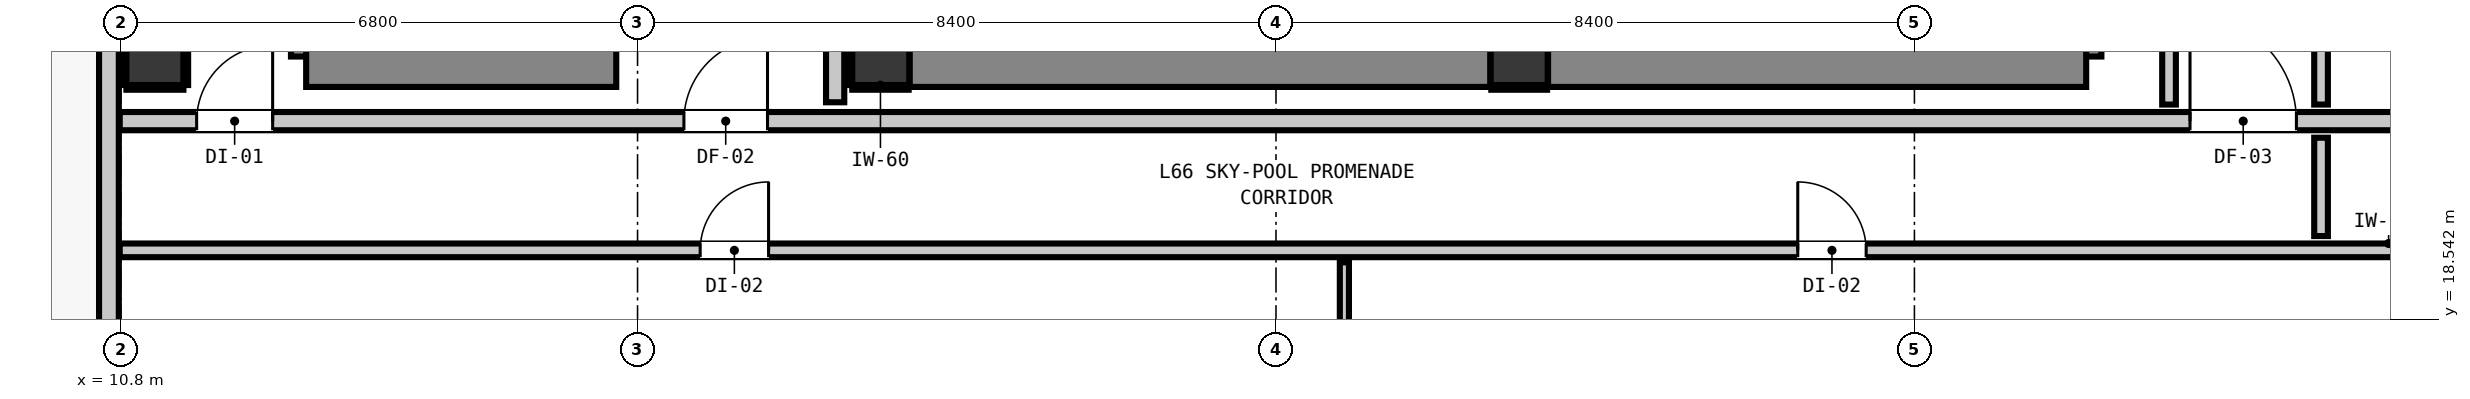
"""IFC4 building model, lengths in metres.
Left out: names, types, materials, properties, quantities, classifications, styles, units other than length and angle.
Written with IfcOpenShell. Run it as: python <this file> out.ifc"""

import sys

from ifc_helpers import new_model, si_unit, direction, frame, frame_2d, origin, origin_2d, place, context, subcontext, project, spatial, rectangle, extrude, element, fill, save


model = new_model("IFC4")
c1 = context("Model", 3, precision=1e-05, world=origin(), true_north=direction((0.0, 1.0)))
c2 = subcontext(c1, "Body", "Model", "MODEL_VIEW")
j1 = project(units=[si_unit("LENGTHUNIT", "METRE"), si_unit("PLANEANGLEUNIT", "RADIAN")], contexts=[c1])
p1 = place(None, origin())
s1 = spatial("IfcSite", under=j1, at=p1, CompositionType="ELEMENT")
p2 = place(p1, origin())
s2 = spatial("IfcBuilding", under=s1, at=p2, CompositionType="ELEMENT")
p3 = place(p2, frame((0.0, 0.0, 226.68)))
s3 = spatial("IfcBuildingStorey", under=s2, at=p3, CompositionType="ELEMENT", Elevation=226.68)
for number, where, z_axis, x_axis in (
    (1, (20.8, 22.0, 0.0), (0.0, 0.0, 1.0), (1.0, 0.0, 0.0)),
    (2, (29.2, 22.0, 0.0), (0.0, 0.0, 1.0), (1.0, 0.0, 0.0)),
):
    element("IfcColumn", number, at=place(p3, frame(where, z_axis=z_axis, x_axis=x_axis)), inside=s3, PredefinedType="COLUMN", context=c2, shape_type="SweptSolid", body=[
        extrude(rectangle(XDim=0.75, YDim=0.75, at=origin_2d()), origin(), (0.0, 0.0, 1.0), 4.6),
    ])
p4 = place(p3, frame((13.44, 22.0, 0.0), z_axis=(0.0, 0.0, 1.0), x_axis=(0.0, 1.0, 0.0)))
e3 = element("IfcWall", 3, at=p4, inside=s3, PredefinedType="SHEAR", context=c2, shape_type="SweptSolid", body=[
    extrude(rectangle(XDim=8.32, YDim=0.8, at=frame_2d((4.16, 0.0))), origin(), (0.0, 0.0, 1.0), 4.6),
])
p5 = place(p3, frame((13.24, 22.0, 0.0), z_axis=(0.0, 0.0, 1.0), x_axis=(1.0, 0.0, 0.0)))
e4 = element("IfcWall", 4, at=p5, inside=s3, PredefinedType="SHEAR", context=c2, shape_type="SweptSolid", body=[
    extrude(rectangle(XDim=4.08, YDim=0.8, at=frame_2d((2.04, 0.0))), origin(), (0.0, 0.0, 1.0), 4.6),
])
p6 = place(p3, frame((36.46, 22.0, 0.0), z_axis=(0.0, 0.0, 1.0), x_axis=(0.0, 1.0, 0.0)))
e5 = element("IfcWall", 5, at=p6, inside=s3, PredefinedType="SHEAR", context=c2, shape_type="SweptSolid", body=[
    extrude(rectangle(XDim=8.32, YDim=0.8, at=frame_2d((4.16, 0.0))), origin(), (0.0, 0.0, 1.0), 4.6),
])
p7 = place(p3, frame((29.58, 22.0, 0.0), z_axis=(0.0, 0.0, 1.0), x_axis=(1.0, 0.0, 0.0)))
e6 = element("IfcWall", 6, at=p7, inside=s3, PredefinedType="SHEAR", context=c2, shape_type="SweptSolid", body=[
    extrude(rectangle(XDim=7.08, YDim=0.8, at=frame_2d((3.54, 0.0))), origin(), (0.0, 0.0, 1.0), 4.6),
])
p8 = place(p3, frame((21.18, 22.0, 0.0), z_axis=(0.0, 0.0, 1.0), x_axis=(1.0, 0.0, 0.0)))
e7 = element("IfcWall", 7, at=p8, inside=s3, PredefinedType="SHEAR", context=c2, shape_type="SweptSolid", body=[
    extrude(rectangle(XDim=7.64, YDim=0.8, at=frame_2d((3.82, 0.0))), origin(), (0.0, 0.0, 1.0), 4.6),
])
p9 = place(p3, frame((11.25, 22.0, 0.0), z_axis=(0.0, 0.0, 1.0), x_axis=(1.0, 0.0, 0.0)))
e8 = element("IfcColumn", 8, at=p9, inside=s3, PredefinedType="COLUMN", context=c2, shape_type="SweptSolid", body=[
    extrude(rectangle(XDim=0.75, YDim=0.75, at=origin_2d()), origin(), (0.0, 0.0, 1.0), 4.18),
])
p10 = place(p3, frame((10.645, 12.345, 0.0), z_axis=(0.0, 0.0, 1.0), x_axis=(0.0, 1.0, 0.0)))
e9 = element("IfcWall", 9, at=p10, inside=s3, PredefinedType="STANDARD", context=c2, shape_type="SweptSolid", body=[
    extrude(rectangle(XDim=30.31, YDim=0.26, at=frame_2d((15.155, 0.0))), origin(), (0.0, 0.0, 1.0), 4.18),
])
p11 = place(p10, frame((0.91, 0.0, 0.0)))
e10 = element("IfcOpeningElement", 10, at=p11, cuts=e9, PredefinedType="OPENING", context=c2, shape_type="SweptSolid", body=[
    extrude(rectangle(XDim=1.0, YDim=2.15, at=frame_2d((0.5, 1.075))), frame((0.0, 0.14, 0.0), z_axis=(0.0, -1.0, 0.0), x_axis=(1.0, 0.0, 0.0)), (0.0, 0.0, 1.0), 0.28),
])
p12 = place(p10, frame((3.732, 0.0, 0.85)))
e11 = element("IfcOpeningElement", 11, at=p12, cuts=e9, PredefinedType="OPENING", context=c2, shape_type="SweptSolid", body=[
    extrude(rectangle(XDim=1.65, YDim=1.75, at=frame_2d((0.825, 0.875))), frame((0.0, 0.14, 0.0), z_axis=(0.0, -1.0, 0.0), x_axis=(1.0, 0.0, 0.0)), (0.0, 0.0, 1.0), 0.28),
])
p13 = place(p3, frame((10.787, 21.15, 0.0), z_axis=(0.0, 0.0, 1.0), x_axis=(1.0, 0.0, 0.0)))
e12 = element("IfcWall", 12, at=p13, inside=s3, PredefinedType="PARTITIONING", context=c2, shape_type="SweptSolid", body=[
    extrude(rectangle(XDim=36.626, YDim=0.24, at=frame_2d((18.313, 0.0))), origin(), (0.0, 0.0, 1.0), 4.18),
])
p14 = place(p13, frame((7.423, 0.0, 0.0)))
e13 = element("IfcOpeningElement", 13, at=p14, cuts=e12, PredefinedType="OPENING", context=c2, shape_type="SweptSolid", body=[
    extrude(rectangle(XDim=1.1, YDim=2.15, at=frame_2d((0.55, 1.075))), frame((0.0, 0.13, 0.0), z_axis=(0.0, -1.0, 0.0), x_axis=(1.0, 0.0, 0.0)), (0.0, 0.0, 1.0), 0.26),
])
p15 = place(p13, frame((1.012, 0.0, 0.0)))
e14 = element("IfcOpeningElement", 14, at=p15, cuts=e12, PredefinedType="OPENING", context=c2, shape_type="SweptSolid", body=[
    extrude(rectangle(XDim=1.0, YDim=2.15, at=frame_2d((0.5, 1.075))), frame((0.0, 0.13, 0.0), z_axis=(0.0, -1.0, 0.0), x_axis=(1.0, 0.0, 0.0)), (0.0, 0.0, 1.0), 0.26),
])
p16 = place(p13, frame((27.239, 0.0, 0.0)))
e15 = element("IfcOpeningElement", 15, at=p16, cuts=e12, PredefinedType="OPENING", context=c2, shape_type="SweptSolid", body=[
    extrude(rectangle(XDim=1.4, YDim=2.15, at=frame_2d((0.7, 1.075))), frame((0.0, 0.13, 0.0), z_axis=(0.0, -1.0, 0.0), x_axis=(1.0, 0.0, 0.0)), (0.0, 0.0, 1.0), 0.26),
])
p17 = place(p3, frame((10.787, 19.45, 0.0), z_axis=(0.0, 0.0, 1.0), x_axis=(1.0, 0.0, 0.0)))
e16 = element("IfcWall", 16, at=p17, inside=s3, PredefinedType="PARTITIONING", context=c2, shape_type="SweptSolid", body=[
    extrude(rectangle(XDim=36.626, YDim=0.18, at=frame_2d((18.313, 0.0))), origin(), (0.0, 0.0, 1.0), 4.18),
])
p18 = place(p17, frame((7.637, 0.0, 0.0)))
e17 = element("IfcOpeningElement", 17, at=p18, cuts=e16, PredefinedType="OPENING", context=c2, shape_type="SweptSolid", body=[
    extrude(rectangle(XDim=0.9, YDim=2.1, at=frame_2d((0.45, 1.05))), frame((0.0, 0.1, 0.0), z_axis=(0.0, -1.0, 0.0), x_axis=(1.0, 0.0, 0.0)), (0.0, 0.0, 1.0), 0.2),
])
p19 = place(p17, frame((22.078, 0.0, 0.0)))
e18 = element("IfcOpeningElement", 18, at=p19, cuts=e16, PredefinedType="OPENING", context=c2, shape_type="SweptSolid", body=[
    extrude(rectangle(XDim=0.9, YDim=2.1, at=frame_2d((0.45, 1.05))), frame((0.0, 0.1, 0.0), z_axis=(0.0, -1.0, 0.0), x_axis=(1.0, 0.0, 0.0)), (0.0, 0.0, 1.0), 0.2),
])
p20 = place(p3, frame((20.2, 21.398, 0.0), z_axis=(0.0, 0.0, 1.0), x_axis=(0.0, 1.0, 0.0)))
e19 = element("IfcWall", 19, at=p20, inside=s3, PredefinedType="PARTITIONING", context=c2, shape_type="SweptSolid", body=[
    extrude(rectangle(XDim=6.754, YDim=0.24, at=frame_2d((3.377, 0.0))), origin(), (0.0, 0.0, 1.0), 2.185),
])
p21 = place(p3, frame((37.75, 21.368, 0.0), z_axis=(0.0, 0.0, 1.0), x_axis=(0.0, 1.0, 0.0)))
e20 = element("IfcWall", 20, at=p21, inside=s3, PredefinedType="PARTITIONING", context=c2, shape_type="SweptSolid", body=[
    extrude(rectangle(XDim=18.694, YDim=0.18, at=frame_2d((9.347, 0.0))), origin(), (0.0, 0.0, 1.0), 4.18),
])
p22 = place(p3, frame((39.75, 19.638, 0.0), z_axis=(0.0, 0.0, 1.0), x_axis=(0.0, 1.0, 0.0)))
e21 = element("IfcWall", 21, at=p22, inside=s3, PredefinedType="PARTITIONING", context=c2, shape_type="SweptSolid", body=[
    extrude(rectangle(XDim=1.294, YDim=0.18, at=frame_2d((0.647, 0.0))), origin(), (0.0, 0.0, 1.0), 4.18),
])
p23 = place(p3, frame((39.75, 21.368, 0.0), z_axis=(0.0, 0.0, 1.0), x_axis=(0.0, 1.0, 0.0)))
e22 = element("IfcWall", 22, at=p23, inside=s3, PredefinedType="PARTITIONING", context=c2, shape_type="SweptSolid", body=[
    extrude(rectangle(XDim=6.814, YDim=0.18, at=frame_2d((3.407, 0.0))), origin(), (0.0, 0.0, 1.0), 4.18),
])
p24 = place(p23, frame((2.981, 0.0, 0.0)))
e23 = element("IfcOpeningElement", 23, at=p24, cuts=e22, PredefinedType="OPENING", context=c2, shape_type="SweptSolid", body=[
    extrude(rectangle(XDim=0.9, YDim=2.1, at=frame_2d((0.45, 1.05))), frame((0.0, 0.1, 0.0), z_axis=(0.0, -1.0, 0.0), x_axis=(1.0, 0.0, 0.0)), (0.0, 0.0, 1.0), 0.2),
])
p25 = place(p3, frame((26.9, 10.387, 0.0), z_axis=(0.0, 0.0, 1.0), x_axis=(0.0, 1.0, 0.0)))
e24 = element("IfcWall", 24, at=p25, inside=s3, PredefinedType="PARTITIONING", context=c2, shape_type="SweptSolid", body=[
    extrude(rectangle(XDim=8.905, YDim=0.12, at=frame_2d((4.453, 0.0))), origin(), (0.0, 0.0, 1.0), 4.18),
])
p26 = place(p3, frame((20.425, 21.593, 0.0), z_axis=(0.0, 0.0, 1.0), x_axis=(1.0, 0.0, 0.0)))
e25 = element("IfcWall", 25, at=p26, inside=s3, PredefinedType="PARTITIONING", context=c2, shape_type="SweptSolid", body=[
    extrude(rectangle(XDim=0.742, YDim=0.06, at=frame_2d((0.371, 0.0))), origin(), (0.0, 0.0, 1.0), 1.45),
])
p27 = place(p3, frame((20.393, 21.625, 0.0), z_axis=(0.0, 0.0, 1.0), x_axis=(0.0, 1.0, 0.0)))
e26 = element("IfcWall", 26, at=p27, inside=s3, PredefinedType="PARTITIONING", context=c2, shape_type="SweptSolid", body=[
    extrude(rectangle(XDim=0.75, YDim=0.06, at=frame_2d((0.375, 0.0))), origin(), (0.0, 0.0, 1.0), 1.45),
])
p28 = place(p3, frame((28.833, 21.593, 0.0), z_axis=(0.0, 0.0, 1.0), x_axis=(1.0, 0.0, 0.0)))
e27 = element("IfcWall", 27, at=p28, inside=s3, PredefinedType="PARTITIONING", context=c2, shape_type="SweptSolid", body=[
    extrude(rectangle(XDim=0.734, YDim=0.06, at=frame_2d((0.367, 0.0))), origin(), (0.0, 0.0, 1.0), 1.45),
])
for number, where, z_axis, x_axis in (
    (28, (10.875, 21.593, 0.0), (0.0, 0.0, 1.0), (1.0, 0.0, 0.0)),
    (29, (10.843, 21.625, 0.0), (0.0, 0.0, 1.0), (0.0, 1.0, 0.0)),
    (30, (11.657, 21.625, 0.0), (0.0, 0.0, 1.0), (0.0, 1.0, 0.0)),
):
    element("IfcWall", number, at=place(p3, frame(where, z_axis=z_axis, x_axis=x_axis)), inside=s3, PredefinedType="PARTITIONING", context=c2, shape_type="SweptSolid", body=[
        extrude(rectangle(XDim=0.75, YDim=0.06, at=frame_2d((0.375, 0.0))), origin(), (0.0, 0.0, 1.0), 1.45),
    ])
p29 = place(p14, origin())
e31 = element("IfcDoor", 31, at=p29, inside=s3, OperationType="SINGLE_SWING_RIGHT", PredefinedType="DOOR", context=c2, shape_type="SweptSolid", body=[
    extrude(rectangle(XDim=1.1, YDim=2.15, at=frame_2d((0.55, 1.075))), frame((0.0, 0.025, 0.0), z_axis=(0.0, -1.0, 0.0), x_axis=(1.0, 0.0, 0.0)), (0.0, 0.0, 1.0), 0.05),
])
fill(e13, e31)
p30 = place(p15, origin())
e32 = element("IfcDoor", 32, at=p30, inside=s3, OperationType="SINGLE_SWING_RIGHT", PredefinedType="DOOR", context=c2, shape_type="SweptSolid", body=[
    extrude(rectangle(XDim=1.0, YDim=2.15, at=frame_2d((0.5, 1.075))), frame((0.0, 0.025, 0.0), z_axis=(0.0, -1.0, 0.0), x_axis=(1.0, 0.0, 0.0)), (0.0, 0.0, 1.0), 0.05),
])
fill(e14, e32)
p31 = place(p16, origin())
e33 = element("IfcDoor", 33, at=p31, inside=s3, OperationType="SINGLE_SWING_LEFT", PredefinedType="DOOR", context=c2, shape_type="SweptSolid", body=[
    extrude(rectangle(XDim=1.4, YDim=2.15, at=frame_2d((0.7, 1.075))), frame((0.0, 0.025, 0.0), z_axis=(0.0, -1.0, 0.0), x_axis=(1.0, 0.0, 0.0)), (0.0, 0.0, 1.0), 0.05),
])
fill(e15, e33)
p32 = place(p18, origin())
e34 = element("IfcDoor", 34, at=p32, inside=s3, OperationType="SINGLE_SWING_RIGHT", PredefinedType="DOOR", context=c2, shape_type="SweptSolid", body=[
    extrude(rectangle(XDim=0.9, YDim=2.1, at=frame_2d((0.45, 1.05))), frame((0.0, 0.025, 0.0), z_axis=(0.0, -1.0, 0.0), x_axis=(1.0, 0.0, 0.0)), (0.0, 0.0, 1.0), 0.05),
])
fill(e17, e34)
p33 = place(p19, origin())
e35 = element("IfcDoor", 35, at=p33, inside=s3, OperationType="SINGLE_SWING_LEFT", PredefinedType="DOOR", context=c2, shape_type="SweptSolid", body=[
    extrude(rectangle(XDim=0.9, YDim=2.1, at=frame_2d((0.45, 1.05))), frame((0.0, 0.025, 0.0), z_axis=(0.0, -1.0, 0.0), x_axis=(1.0, 0.0, 0.0)), (0.0, 0.0, 1.0), 0.05),
])
fill(e18, e35)
save(model, sys.argv[1])
